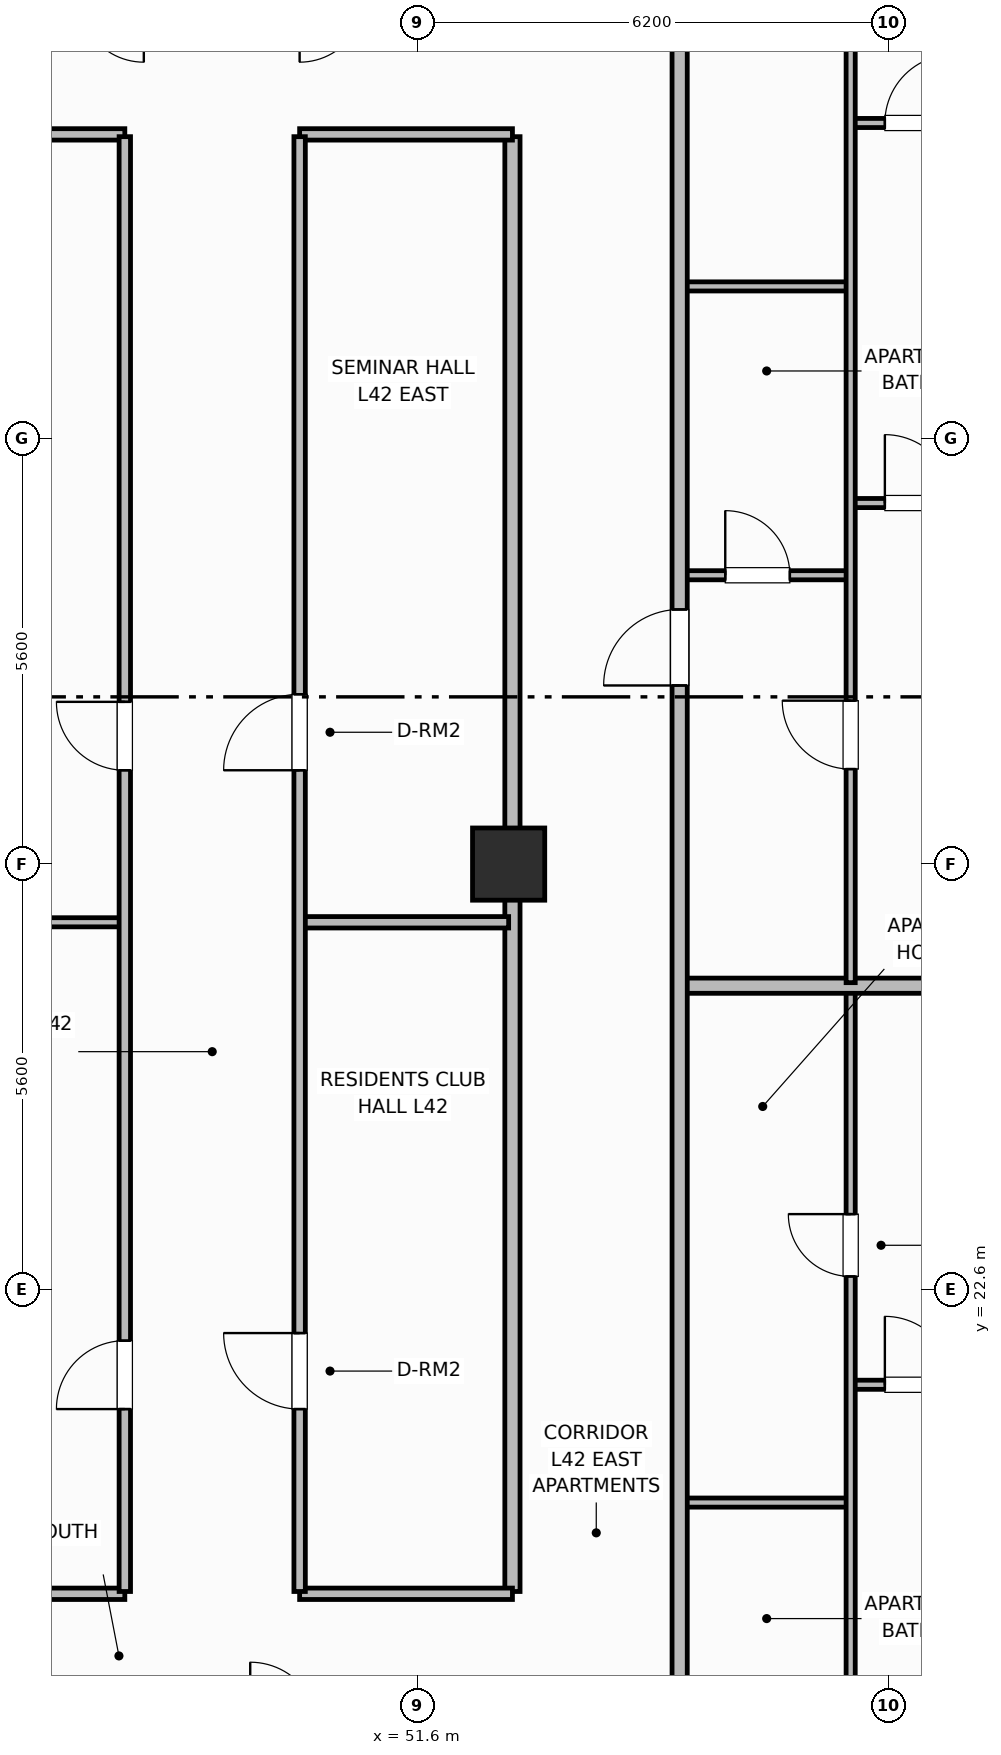
"""IFC4 building model, lengths in metres.
Left out: names, types, materials, properties, quantities, classifications, styles, units other than length and angle.
Written with IfcOpenShell. Run it as: python <this file> out.ifc"""

import sys

from ifc_helpers import new_model, si_unit, direction, frame, frame_2d, origin, origin_2d, place, context, subcontext, project, spatial, rectangle, extrude, element, fill, save


model = new_model("IFC4")
c1 = context("Model", 3, precision=1e-05, world=origin(), true_north=direction((0.0, 1.0)))
c2 = subcontext(c1, "Body", "Model", "MODEL_VIEW")
j1 = project(units=[si_unit("LENGTHUNIT", "METRE"), si_unit("PLANEANGLEUNIT", "RADIAN")], contexts=[c1])
p1 = place(None, origin())
s1 = spatial("IfcSite", under=j1, at=p1, CompositionType="ELEMENT")
p2 = place(p1, origin())
s2 = spatial("IfcBuilding", under=s1, at=p2, CompositionType="ELEMENT")
p3 = place(p2, frame((0.0, 0.0, 170.0)))
s3 = spatial("IfcBuildingStorey", under=s2, at=p3, CompositionType="ELEMENT", Elevation=170.0)
p4 = place(p3, frame((52.8, 28.2, 0.0), z_axis=(0.0, 0.0, 1.0), x_axis=(1.0, 0.0, 0.0)))
e1 = element("IfcColumn", 1, at=p4, inside=s3, PredefinedType="COLUMN", context=c2, shape_type="SweptSolid", body=[
    extrude(rectangle(XDim=0.95, YDim=0.95, at=origin_2d()), origin(), (0.0, 0.0, 1.0), 3.7),
])
p5 = place(p3, frame((52.85, 18.63, 0.0), z_axis=(0.0, 0.0, 1.0), x_axis=(0.0, 1.0, 0.0)))
e2 = element("IfcWall", 2, at=p5, inside=s3, PredefinedType="PARTITIONING", context=c2, shape_type="SweptSolid", body=[
    extrude(rectangle(XDim=19.14, YDim=0.2, at=frame_2d((9.57, 0.0))), origin(), (0.0, 0.0, 1.0), 2.55),
])
p6 = place(p3, frame((25.55, 18.6, 0.0), z_axis=(0.0, 0.0, 1.0), x_axis=(1.0, 0.0, 0.0)))
e3 = element("IfcWall", 3, at=p6, inside=s3, PredefinedType="PARTITIONING", context=c2, shape_type="SweptSolid", body=[
    extrude(rectangle(XDim=22.2, YDim=0.15, at=frame_2d((11.1, 0.0))), origin(), (0.0, 0.0, 1.0), 2.55),
])
p7 = place(p3, frame((50.05, 18.6, 0.0), z_axis=(0.0, 0.0, 1.0), x_axis=(1.0, 0.0, 0.0)))
e4 = element("IfcWall", 4, at=p7, inside=s3, PredefinedType="PARTITIONING", context=c2, shape_type="SweptSolid", body=[
    extrude(rectangle(XDim=2.8, YDim=0.15, at=frame_2d((1.4, 0.0))), origin(), (0.0, 0.0, 1.0), 2.55),
])
p8 = place(p3, frame((25.55, 37.8, 0.0), z_axis=(0.0, 0.0, 1.0), x_axis=(1.0, 0.0, 0.0)))
e5 = element("IfcWall", 5, at=p8, inside=s3, PredefinedType="PARTITIONING", context=c2, shape_type="SweptSolid", body=[
    extrude(rectangle(XDim=22.2, YDim=0.15, at=frame_2d((11.1, 0.0))), origin(), (0.0, 0.0, 1.0), 2.55),
])
p9 = place(p3, frame((50.05, 37.8, 0.0), z_axis=(0.0, 0.0, 1.0), x_axis=(1.0, 0.0, 0.0)))
e6 = element("IfcWall", 6, at=p9, inside=s3, PredefinedType="PARTITIONING", context=c2, shape_type="SweptSolid", body=[
    extrude(rectangle(XDim=2.8, YDim=0.15, at=frame_2d((1.4, 0.0))), origin(), (0.0, 0.0, 1.0), 2.55),
])
p10 = place(p3, frame((34.95, 27.434, 0.0), z_axis=(0.0, 0.0, 1.0), x_axis=(1.0, 0.0, 0.0)))
e7 = element("IfcWall", 7, at=p10, inside=s3, PredefinedType="PARTITIONING", context=c2, shape_type="SweptSolid", body=[
    extrude(rectangle(XDim=12.81, YDim=0.12, at=frame_2d((6.405, 0.0))), origin(), (0.0, 0.0, 1.0), 2.55),
])
p11 = place(p3, frame((50.08, 27.434, 0.0), z_axis=(0.0, 0.0, 1.0), x_axis=(1.0, 0.0, 0.0)))
e8 = element("IfcWall", 8, at=p11, inside=s3, PredefinedType="PARTITIONING", context=c2, shape_type="SweptSolid", body=[
    extrude(rectangle(XDim=2.72, YDim=0.15, at=frame_2d((1.36, 0.0))), origin(), (0.0, 0.0, 1.0), 2.55),
])
p12 = place(p3, frame((47.75, 18.63, 0.0), z_axis=(0.0, 0.0, 1.0), x_axis=(0.0, 1.0, 0.0)))
e9 = element("IfcWall", 9, at=p12, inside=s3, PredefinedType="PARTITIONING", context=c2, shape_type="SweptSolid", body=[
    extrude(rectangle(XDim=19.14, YDim=0.15, at=frame_2d((9.57, 0.0))), origin(), (0.0, 0.0, 1.0), 2.55),
])
p13 = place(p12, frame((2.4, 0.0, 0.0)))
e10 = element("IfcOpeningElement", 10, at=p13, cuts=e9, PredefinedType="OPENING", context=c2, shape_type="SweptSolid", body=[
    extrude(rectangle(XDim=0.9, YDim=2.1, at=frame_2d((0.45, 1.05))), frame((0.0, 0.085, 0.0), z_axis=(0.0, -1.0, 0.0), x_axis=(1.0, 0.0, 0.0)), (0.0, 0.0, 1.0), 0.17),
])
p14 = place(p12, frame((10.804, 0.0, 0.0)))
e11 = element("IfcOpeningElement", 11, at=p14, cuts=e9, PredefinedType="OPENING", context=c2, shape_type="SweptSolid", body=[
    extrude(rectangle(XDim=0.9, YDim=2.1, at=frame_2d((0.45, 1.05))), frame((0.0, 0.085, 0.0), z_axis=(0.0, -1.0, 0.0), x_axis=(1.0, 0.0, 0.0)), (0.0, 0.0, 1.0), 0.17),
])
p15 = place(p3, frame((50.05, 18.63, 0.0), z_axis=(0.0, 0.0, 1.0), x_axis=(0.0, 1.0, 0.0)))
e12 = element("IfcWall", 12, at=p15, inside=s3, PredefinedType="PARTITIONING", context=c2, shape_type="SweptSolid", body=[
    extrude(rectangle(XDim=19.14, YDim=0.15, at=frame_2d((9.57, 0.0))), origin(), (0.0, 0.0, 1.0), 2.55),
])
p16 = place(p15, frame((2.4, 0.0, 0.0)))
e13 = element("IfcOpeningElement", 13, at=p16, cuts=e12, PredefinedType="OPENING", context=c2, shape_type="SweptSolid", body=[
    extrude(rectangle(XDim=1.0, YDim=2.15, at=frame_2d((0.5, 1.075))), frame((0.0, 0.085, 0.0), z_axis=(0.0, -1.0, 0.0), x_axis=(1.0, 0.0, 0.0)), (0.0, 0.0, 1.0), 0.17),
])
p17 = place(p15, frame((10.804, 0.0, 0.0)))
e14 = element("IfcOpeningElement", 14, at=p17, cuts=e12, PredefinedType="OPENING", context=c2, shape_type="SweptSolid", body=[
    extrude(rectangle(XDim=1.0, YDim=2.15, at=frame_2d((0.5, 1.075))), frame((0.0, 0.085, 0.0), z_axis=(0.0, -1.0, 0.0), x_axis=(1.0, 0.0, 0.0)), (0.0, 0.0, 1.0), 0.17),
])
p18 = place(p3, frame((55.05, 19.8, 0.0), z_axis=(0.0, 0.0, 1.0), x_axis=(1.0, 0.0, 0.0)))
e15 = element("IfcWall", 15, at=p18, inside=s3, PredefinedType="PARTITIONING", context=c2, shape_type="SweptSolid", body=[
    extrude(rectangle(XDim=2.25, YDim=0.12, at=frame_2d((1.125, 0.0))), origin(), (0.0, 0.0, 1.0), 2.55),
])
p19 = place(p3, frame((57.3, 21.35, 0.0), z_axis=(0.0, 0.0, 1.0), x_axis=(1.0, 0.0, 0.0)))
e16 = element("IfcWall", 16, at=p19, inside=s3, PredefinedType="PARTITIONING", context=c2, shape_type="SweptSolid", body=[
    extrude(rectangle(XDim=4.53, YDim=0.12, at=frame_2d((2.265, 0.0))), origin(), (0.0, 0.0, 1.0), 2.55),
])
p20 = place(p19, frame((0.45, 0.0, 0.0)))
e17 = element("IfcOpeningElement", 17, at=p20, cuts=e16, PredefinedType="OPENING", context=c2, shape_type="SweptSolid", body=[
    extrude(rectangle(XDim=0.9, YDim=2.1, at=frame_2d((0.45, 1.05))), frame((0.0, 0.07, 0.0), z_axis=(0.0, -1.0, 0.0), x_axis=(1.0, 0.0, 0.0)), (0.0, 0.0, 1.0), 0.14),
])
p21 = place(p3, frame((57.3, 10.64, 0.0), z_axis=(0.0, 0.0, 1.0), x_axis=(0.0, 1.0, 0.0)))
e18 = element("IfcWall", 18, at=p21, inside=s3, PredefinedType="PARTITIONING", context=c2, shape_type="SweptSolid", body=[
    extrude(rectangle(XDim=15.92, YDim=0.12, at=frame_2d((7.96, 0.0))), origin(), (0.0, 0.0, 1.0), 2.55),
])
p22 = place(p21, frame((0.41, 0.0, 0.0)))
e19 = element("IfcOpeningElement", 19, at=p22, cuts=e18, PredefinedType="OPENING", context=c2, shape_type="SweptSolid", body=[
    extrude(rectangle(XDim=0.9, YDim=2.1, at=frame_2d((0.45, 1.05))), frame((0.0, 0.07, 0.0), z_axis=(0.0, -1.0, 0.0), x_axis=(1.0, 0.0, 0.0)), (0.0, 0.0, 1.0), 0.14),
])
p23 = place(p21, frame((12.135, 0.0, 0.0)))
e20 = element("IfcOpeningElement", 20, at=p23, cuts=e18, PredefinedType="OPENING", context=c2, shape_type="SweptSolid", body=[
    extrude(rectangle(XDim=0.82, YDim=2.08, at=frame_2d((0.41, 1.04))), frame((0.0, 0.07, 0.0), z_axis=(0.0, -1.0, 0.0), x_axis=(1.0, 0.0, 0.0)), (0.0, 0.0, 1.0), 0.14),
])
p24 = place(p3, frame((55.05, 26.6, 0.0), z_axis=(0.0, 0.0, 1.0), x_axis=(1.0, 0.0, 0.0)))
e21 = element("IfcWall", 21, at=p24, inside=s3, PredefinedType="PARTITIONING", context=c2, shape_type="SweptSolid", body=[
    extrude(rectangle(XDim=6.066, YDim=0.2, at=frame_2d((3.033, 0.0))), origin(), (0.0, 0.0, 1.0), 2.55),
])
p25 = place(p3, frame((55.05, 32.0, 0.0), z_axis=(0.0, 0.0, 1.0), x_axis=(1.0, 0.0, 0.0)))
e22 = element("IfcWall", 22, at=p25, inside=s3, PredefinedType="PARTITIONING", context=c2, shape_type="SweptSolid", body=[
    extrude(rectangle(XDim=2.25, YDim=0.12, at=frame_2d((1.125, 0.0))), origin(), (0.0, 0.0, 1.0), 2.55),
])
p26 = place(p25, frame((0.6, 0.0, 0.0)))
e23 = element("IfcOpeningElement", 23, at=p26, cuts=e22, PredefinedType="OPENING", context=c2, shape_type="SweptSolid", body=[
    extrude(rectangle(XDim=0.85, YDim=2.1, at=frame_2d((0.425, 1.05))), frame((0.0, 0.07, 0.0), z_axis=(0.0, -1.0, 0.0), x_axis=(1.0, 0.0, 0.0)), (0.0, 0.0, 1.0), 0.14),
])
p27 = place(p3, frame((55.05, 35.8, 0.0), z_axis=(0.0, 0.0, 1.0), x_axis=(1.0, 0.0, 0.0)))
e24 = element("IfcWall", 24, at=p27, inside=s3, PredefinedType="PARTITIONING", context=c2, shape_type="SweptSolid", body=[
    extrude(rectangle(XDim=2.25, YDim=0.12, at=frame_2d((1.125, 0.0))), origin(), (0.0, 0.0, 1.0), 2.55),
])
p28 = place(p3, frame((57.3, 32.95, 0.0), z_axis=(0.0, 0.0, 1.0), x_axis=(1.0, 0.0, 0.0)))
e25 = element("IfcWall", 25, at=p28, inside=s3, PredefinedType="PARTITIONING", context=c2, shape_type="SweptSolid", body=[
    extrude(rectangle(XDim=4.53, YDim=0.12, at=frame_2d((2.265, 0.0))), origin(), (0.0, 0.0, 1.0), 2.55),
])
p29 = place(p28, frame((0.45, 0.0, 0.0)))
e26 = element("IfcOpeningElement", 26, at=p29, cuts=e25, PredefinedType="OPENING", context=c2, shape_type="SweptSolid", body=[
    extrude(rectangle(XDim=0.9, YDim=2.1, at=frame_2d((0.45, 1.05))), frame((0.0, 0.07, 0.0), z_axis=(0.0, -1.0, 0.0), x_axis=(1.0, 0.0, 0.0)), (0.0, 0.0, 1.0), 0.14),
])
p30 = place(p3, frame((57.3, 37.95, 0.0), z_axis=(0.0, 0.0, 1.0), x_axis=(1.0, 0.0, 0.0)))
e27 = element("IfcWall", 27, at=p30, inside=s3, PredefinedType="PARTITIONING", context=c2, shape_type="SweptSolid", body=[
    extrude(rectangle(XDim=4.53, YDim=0.12, at=frame_2d((2.265, 0.0))), origin(), (0.0, 0.0, 1.0), 2.55),
])
p31 = place(p30, frame((0.45, 0.0, 0.0)))
e28 = element("IfcOpeningElement", 28, at=p31, cuts=e27, PredefinedType="OPENING", context=c2, shape_type="SweptSolid", body=[
    extrude(rectangle(XDim=0.9, YDim=2.1, at=frame_2d((0.45, 1.05))), frame((0.0, 0.07, 0.0), z_axis=(0.0, -1.0, 0.0), x_axis=(1.0, 0.0, 0.0)), (0.0, 0.0, 1.0), 0.14),
])
p32 = place(p3, frame((57.3, 26.64, 0.0), z_axis=(0.0, 0.0, 1.0), x_axis=(0.0, 1.0, 0.0)))
e29 = element("IfcWall", 29, at=p32, inside=s3, PredefinedType="PARTITIONING", context=c2, shape_type="SweptSolid", body=[
    extrude(rectangle(XDim=19.12, YDim=0.12, at=frame_2d((9.56, 0.0))), origin(), (0.0, 0.0, 1.0), 2.55),
])
p33 = place(p32, frame((2.81, 0.0, 0.0)))
e30 = element("IfcOpeningElement", 30, at=p33, cuts=e29, PredefinedType="OPENING", context=c2, shape_type="SweptSolid", body=[
    extrude(rectangle(XDim=0.9, YDim=2.1, at=frame_2d((0.45, 1.05))), frame((0.0, 0.07, 0.0), z_axis=(0.0, -1.0, 0.0), x_axis=(1.0, 0.0, 0.0)), (0.0, 0.0, 1.0), 0.14),
])
p34 = place(p32, frame((15.365, 0.0, 0.0)))
e31 = element("IfcOpeningElement", 31, at=p34, cuts=e29, PredefinedType="OPENING", context=c2, shape_type="SweptSolid", body=[
    extrude(rectangle(XDim=0.82, YDim=2.08, at=frame_2d((0.41, 1.04))), frame((0.0, 0.07, 0.0), z_axis=(0.0, -1.0, 0.0), x_axis=(1.0, 0.0, 0.0)), (0.0, 0.0, 1.0), 0.14),
])
p35 = place(p3, frame((55.05, 10.6, 0.0), z_axis=(0.0, 0.0, 1.0), x_axis=(0.0, 1.0, 0.0)))
e32 = element("IfcWall", 32, at=p35, inside=s3, PredefinedType="PARTITIONING", context=c2, shape_type="SweptSolid", body=[
    extrude(rectangle(XDim=35.2, YDim=0.2, at=frame_2d((17.6, 0.0))), origin(), (0.0, 0.0, 1.0), 2.55),
])
p36 = place(p35, frame((2.65, 0.0, 0.0)))
e33 = element("IfcOpeningElement", 33, at=p36, cuts=e32, PredefinedType="OPENING", context=c2, shape_type="SweptSolid", body=[
    extrude(rectangle(XDim=1.0, YDim=2.15, at=frame_2d((0.5, 1.075))), frame((0.0, 0.11, 0.0), z_axis=(0.0, -1.0, 0.0), x_axis=(1.0, 0.0, 0.0)), (0.0, 0.0, 1.0), 0.22),
])
p37 = place(p35, frame((19.95, 0.0, 0.0)))
e34 = element("IfcOpeningElement", 34, at=p37, cuts=e32, PredefinedType="OPENING", context=c2, shape_type="SweptSolid", body=[
    extrude(rectangle(XDim=1.0, YDim=2.15, at=frame_2d((0.5, 1.075))), frame((0.0, 0.11, 0.0), z_axis=(0.0, -1.0, 0.0), x_axis=(1.0, 0.0, 0.0)), (0.0, 0.0, 1.0), 0.22),
])
p38 = place(p13, origin())
e35 = element("IfcDoor", 35, at=p38, inside=s3, OperationType="SINGLE_SWING_LEFT", PredefinedType="DOOR", context=c2, shape_type="SweptSolid", body=[
    extrude(rectangle(XDim=0.9, YDim=2.1, at=frame_2d((0.45, 1.05))), frame((0.0, 0.025, 0.0), z_axis=(0.0, -1.0, 0.0), x_axis=(1.0, 0.0, 0.0)), (0.0, 0.0, 1.0), 0.05),
])
fill(e10, e35)
p39 = place(p14, origin())
e36 = element("IfcDoor", 36, at=p39, inside=s3, OperationType="SINGLE_SWING_RIGHT", PredefinedType="DOOR", context=c2, shape_type="SweptSolid", body=[
    extrude(rectangle(XDim=0.9, YDim=2.1, at=frame_2d((0.45, 1.05))), frame((0.0, 0.025, 0.0), z_axis=(0.0, -1.0, 0.0), x_axis=(1.0, 0.0, 0.0)), (0.0, 0.0, 1.0), 0.05),
])
fill(e11, e36)
p40 = place(p16, origin())
e37 = element("IfcDoor", 37, at=p40, inside=s3, OperationType="SINGLE_SWING_RIGHT", PredefinedType="DOOR", context=c2, shape_type="SweptSolid", body=[
    extrude(rectangle(XDim=1.0, YDim=2.15, at=frame_2d((0.5, 1.075))), frame((0.0, 0.025, 0.0), z_axis=(0.0, -1.0, 0.0), x_axis=(1.0, 0.0, 0.0)), (0.0, 0.0, 1.0), 0.05),
])
fill(e13, e37)
p41 = place(p17, origin())
e38 = element("IfcDoor", 38, at=p41, inside=s3, OperationType="SINGLE_SWING_LEFT", PredefinedType="DOOR", context=c2, shape_type="SweptSolid", body=[
    extrude(rectangle(XDim=1.0, YDim=2.15, at=frame_2d((0.5, 1.075))), frame((0.0, 0.025, 0.0), z_axis=(0.0, -1.0, 0.0), x_axis=(1.0, 0.0, 0.0)), (0.0, 0.0, 1.0), 0.05),
])
fill(e14, e38)
p42 = place(p20, origin())
e39 = element("IfcDoor", 39, at=p42, inside=s3, OperationType="SINGLE_SWING_LEFT", PredefinedType="DOOR", context=c2, shape_type="SweptSolid", body=[
    extrude(rectangle(XDim=0.9, YDim=2.1, at=frame_2d((0.45, 1.05))), frame((0.0, 0.025, 0.0), z_axis=(0.0, -1.0, 0.0), x_axis=(1.0, 0.0, 0.0)), (0.0, 0.0, 1.0), 0.05),
])
fill(e17, e39)
p43 = place(p23, origin())
e40 = element("IfcDoor", 40, at=p43, inside=s3, OperationType="SINGLE_SWING_RIGHT", PredefinedType="DOOR", context=c2, shape_type="SweptSolid", body=[
    extrude(rectangle(XDim=0.82, YDim=2.08, at=frame_2d((0.41, 1.04))), frame((0.0, 0.025, 0.0), z_axis=(0.0, -1.0, 0.0), x_axis=(1.0, 0.0, 0.0)), (0.0, 0.0, 1.0), 0.05),
])
fill(e20, e40)
p44 = place(p26, origin())
e41 = element("IfcDoor", 41, at=p44, inside=s3, OperationType="SINGLE_SWING_LEFT", PredefinedType="DOOR", context=c2, shape_type="SweptSolid", body=[
    extrude(rectangle(XDim=0.85, YDim=2.1, at=frame_2d((0.425, 1.05))), frame((0.0, 0.025, 0.0), z_axis=(0.0, -1.0, 0.0), x_axis=(1.0, 0.0, 0.0)), (0.0, 0.0, 1.0), 0.05),
])
fill(e23, e41)
p45 = place(p29, origin())
e42 = element("IfcDoor", 42, at=p45, inside=s3, OperationType="SINGLE_SWING_LEFT", PredefinedType="DOOR", context=c2, shape_type="SweptSolid", body=[
    extrude(rectangle(XDim=0.9, YDim=2.1, at=frame_2d((0.45, 1.05))), frame((0.0, 0.025, 0.0), z_axis=(0.0, -1.0, 0.0), x_axis=(1.0, 0.0, 0.0)), (0.0, 0.0, 1.0), 0.05),
])
fill(e26, e42)
p46 = place(p31, origin())
e43 = element("IfcDoor", 43, at=p46, inside=s3, OperationType="SINGLE_SWING_RIGHT", PredefinedType="DOOR", context=c2, shape_type="SweptSolid", body=[
    extrude(rectangle(XDim=0.9, YDim=2.1, at=frame_2d((0.45, 1.05))), frame((0.0, 0.025, 0.0), z_axis=(0.0, -1.0, 0.0), x_axis=(1.0, 0.0, 0.0)), (0.0, 0.0, 1.0), 0.05),
])
fill(e28, e43)
p47 = place(p33, origin())
e44 = element("IfcDoor", 44, at=p47, inside=s3, OperationType="SINGLE_SWING_RIGHT", PredefinedType="DOOR", context=c2, shape_type="SweptSolid", body=[
    extrude(rectangle(XDim=0.9, YDim=2.1, at=frame_2d((0.45, 1.05))), frame((0.0, 0.025, 0.0), z_axis=(0.0, -1.0, 0.0), x_axis=(1.0, 0.0, 0.0)), (0.0, 0.0, 1.0), 0.05),
])
fill(e30, e44)
p48 = place(p37, origin())
e45 = element("IfcDoor", 45, at=p48, inside=s3, OperationType="SINGLE_SWING_LEFT", PredefinedType="DOOR", context=c2, shape_type="SweptSolid", body=[
    extrude(rectangle(XDim=1.0, YDim=2.15, at=frame_2d((0.5, 1.075))), frame((0.0, 0.025, 0.0), z_axis=(0.0, -1.0, 0.0), x_axis=(1.0, 0.0, 0.0)), (0.0, 0.0, 1.0), 0.05),
])
fill(e34, e45)
save(model, sys.argv[1])
